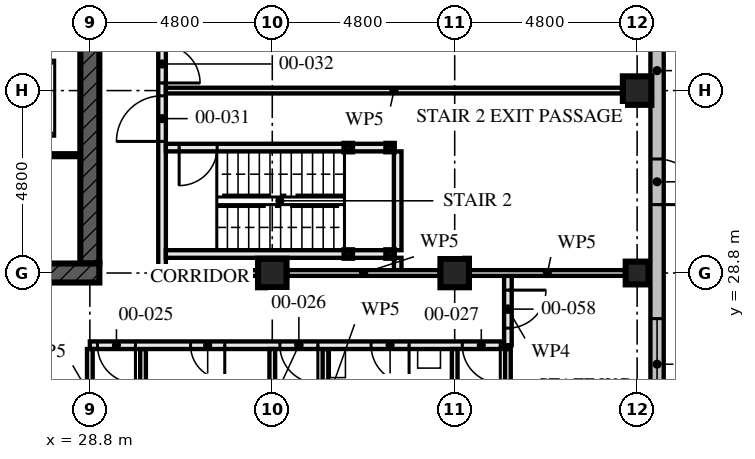
"""IFC4 building model, lengths in metres.
Left out: names, types, materials, properties, quantities, classifications, styles, units other than length and angle.
Written with IfcOpenShell. Run it as: python <this file> out.ifc"""

import sys

from ifc_helpers import new_model, si_unit, direction, frame, frame_2d, origin, origin_2d, place, context, subcontext, project, spatial, rectangle, hollow_rectangle, extrude, element, fill, save


model = new_model("IFC4")
c1 = context("Model", 3, precision=1e-05, world=origin(), true_north=direction((0.0, 1.0)))
c2 = subcontext(c1, "Body", "Model", "MODEL_VIEW")
j1 = project(units=[si_unit("LENGTHUNIT", "METRE"), si_unit("PLANEANGLEUNIT", "RADIAN")], contexts=[c1])
p1 = place(None, origin())
s1 = spatial("IfcSite", under=j1, at=p1, CompositionType="ELEMENT")
p2 = place(p1, origin())
s2 = spatial("IfcBuilding", under=s1, at=p2, CompositionType="ELEMENT")
p3 = place(p2, origin())
s3 = spatial("IfcBuildingStorey", under=s2, at=p3, CompositionType="ELEMENT", Elevation=0.0)
for number, where, z_axis, x_axis in (
    (1, (33.6, 28.8, 0.0), (0.0, 0.0, 1.0), (0.0, 1.0, 0.0)),
    (2, (38.4, 28.8, 0.0), (0.0, 0.0, 1.0), (0.0, 1.0, 0.0)),
):
    element("IfcColumn", number, at=place(p3, frame(where, z_axis=z_axis, x_axis=x_axis)), inside=s3, PredefinedType="COLUMN", context=c2, shape_type="SweptSolid", body=[
        extrude(hollow_rectangle(XDim=0.75, YDim=0.75, WallThickness=0.08, at=origin_2d()), origin(), (0.0, 0.0, 1.0), 4.5),
    ])
p4 = place(p3, frame((43.2, 28.8, 0.0), z_axis=(0.0, 0.0, 1.0), x_axis=(0.0, 1.0, 0.0)))
e3 = element("IfcColumn", 3, at=p4, inside=s3, PredefinedType="COLUMN", context=c2, shape_type="SweptSolid", body=[
    extrude(hollow_rectangle(XDim=0.6, YDim=0.6, WallThickness=0.08, at=origin_2d()), origin(), (0.0, 0.0, 1.0), 4.5),
])
p5 = place(p3, frame((43.2, 33.6, 0.0), z_axis=(0.0, 0.0, 1.0), x_axis=(1.0, 0.0, 0.0)))
e4 = element("IfcColumn", 4, at=p5, inside=s3, PredefinedType="COLUMN", context=c2, shape_type="SweptSolid", body=[
    extrude(hollow_rectangle(XDim=0.75, YDim=0.75, WallThickness=0.08, at=origin_2d()), origin(), (0.0, 0.0, 1.0), 4.5),
])
p6 = place(p3, frame((14.15, 28.8, -1.8), z_axis=(0.0, 0.0, 1.0), x_axis=(1.0, 0.0, 0.0)))
e5 = element("IfcWall", 5, at=p6, inside=s3, PredefinedType="SHEAR", context=c2, shape_type="SweptSolid", body=[
    extrude(rectangle(XDim=14.9, YDim=0.5, at=frame_2d((7.45, 0.0))), origin(), (0.0, 0.0, 1.0), 6.13),
])
p7 = place(p6, frame((6.85, 0.0, 1.8)))
e6 = element("IfcOpeningElement", 6, at=p7, cuts=e5, PredefinedType="OPENING", context=c2, shape_type="SweptSolid", body=[
    extrude(rectangle(XDim=1.2, YDim=2.1, at=frame_2d((0.6, 1.05))), frame((0.0, 0.26, 0.0), z_axis=(0.0, -1.0, 0.0), x_axis=(1.0, 0.0, 0.0)), (0.0, 0.0, 1.0), 0.521),
])
p8 = place(p3, frame((28.8, 29.05, -1.8), z_axis=(0.0, 0.0, 1.0), x_axis=(0.0, 1.0, 0.0)))
e7 = element("IfcWall", 7, at=p8, inside=s3, PredefinedType="SHEAR", context=c2, shape_type="SweptSolid", body=[
    extrude(rectangle(XDim=13.9, YDim=0.5, at=frame_2d((6.95, 0.0))), origin(), (0.0, 0.0, 1.0), 6.13),
])
p9 = place(p8, frame((6.35, 0.0, 1.8)))
e8 = element("IfcOpeningElement", 8, at=p9, cuts=e7, PredefinedType="OPENING", context=c2, shape_type="SweptSolid", body=[
    extrude(rectangle(XDim=1.2, YDim=2.1, at=frame_2d((0.6, 1.05))), frame((0.0, 0.26, 0.0), z_axis=(0.0, -1.0, 0.0), x_axis=(1.0, 0.0, 0.0)), (0.0, 0.0, 1.0), 0.521),
])
for number, where, z_axis, x_axis in (
    (9, (36.7, 29.3, 0.0), (0.0, 0.0, 1.0), (1.0, 0.0, 0.0)),
    (10, (36.7, 32.1, 0.0), (0.0, 0.0, 1.0), (1.0, 0.0, 0.0)),
    (11, (35.6, 29.3, 0.0), (0.0, 0.0, 1.0), (1.0, 0.0, 0.0)),
    (12, (35.6, 32.1, 0.0), (0.0, 0.0, 1.0), (1.0, 0.0, 0.0)),
):
    element("IfcColumn", number, at=place(p3, frame(where, z_axis=z_axis, x_axis=x_axis)), inside=s3, PredefinedType="COLUMN", context=c2, shape_type="SweptSolid", body=[
        extrude(hollow_rectangle(XDim=0.2, YDim=0.2, WallThickness=0.008, at=origin_2d()), origin(), (0.0, 0.0, 1.0), 4.33),
    ])
p10 = place(p3, frame((43.725, 14.925, 0.0), z_axis=(0.0, 0.0, 1.0), x_axis=(0.0, 1.0, 0.0)))
e13 = element("IfcWall", 13, at=p10, inside=s3, PredefinedType="SOLIDWALL", context=c2, shape_type="SweptSolid", body=[
    extrude(rectangle(XDim=38.4, YDim=0.35, at=frame_2d((19.2, 0.0))), origin(), (0.0, 0.0, 1.0), 4.5),
])
p11 = place(p10, frame((15.675, 0.0, 0.0)))
e14 = element("IfcOpeningElement", 14, at=p11, cuts=e13, PredefinedType="OPENING", context=c2, shape_type="SweptSolid", body=[
    extrude(rectangle(XDim=1.2, YDim=2.4, at=frame_2d((0.6, 1.2))), frame((0.0, 0.186, 0.0), z_axis=(0.0, -1.0, 0.0), x_axis=(1.0, 0.0, 0.0)), (0.0, 0.0, 1.0), 0.371),
])
p12 = place(p10, frame((0.675, 0.0, 0.9)))
e15 = element("IfcOpeningElement", 15, at=p12, cuts=e13, PredefinedType="OPENING", context=c2, shape_type="SweptSolid", body=[
    extrude(rectangle(XDim=2.4, YDim=2.4, at=frame_2d((1.2, 1.2))), frame((0.0, 0.186, 0.0), z_axis=(0.0, -1.0, 0.0), x_axis=(1.0, 0.0, 0.0)), (0.0, 0.0, 1.0), 0.371),
])
p13 = place(p10, frame((5.475, 0.0, 0.9)))
e16 = element("IfcOpeningElement", 16, at=p13, cuts=e13, PredefinedType="OPENING", context=c2, shape_type="SweptSolid", body=[
    extrude(rectangle(XDim=2.4, YDim=2.4, at=frame_2d((1.2, 1.2))), frame((0.0, 0.186, 0.0), z_axis=(0.0, -1.0, 0.0), x_axis=(1.0, 0.0, 0.0)), (0.0, 0.0, 1.0), 0.371),
])
p14 = place(p10, frame((10.275, 0.0, 0.9)))
e17 = element("IfcOpeningElement", 17, at=p14, cuts=e13, PredefinedType="OPENING", context=c2, shape_type="SweptSolid", body=[
    extrude(rectangle(XDim=2.4, YDim=2.4, at=frame_2d((1.2, 1.2))), frame((0.0, 0.186, 0.0), z_axis=(0.0, -1.0, 0.0), x_axis=(1.0, 0.0, 0.0)), (0.0, 0.0, 1.0), 0.371),
])
p15 = place(p10, frame((19.875, 0.0, 0.9)))
e18 = element("IfcOpeningElement", 18, at=p15, cuts=e13, PredefinedType="OPENING", context=c2, shape_type="SweptSolid", body=[
    extrude(rectangle(XDim=2.4, YDim=2.4, at=frame_2d((1.2, 1.2))), frame((0.0, 0.186, 0.0), z_axis=(0.0, -1.0, 0.0), x_axis=(1.0, 0.0, 0.0)), (0.0, 0.0, 1.0), 0.371),
])
p16 = place(p10, frame((24.675, 0.0, 0.9)))
e19 = element("IfcOpeningElement", 19, at=p16, cuts=e13, PredefinedType="OPENING", context=c2, shape_type="SweptSolid", body=[
    extrude(rectangle(XDim=2.4, YDim=2.4, at=frame_2d((1.2, 1.2))), frame((0.0, 0.186, 0.0), z_axis=(0.0, -1.0, 0.0), x_axis=(1.0, 0.0, 0.0)), (0.0, 0.0, 1.0), 0.371),
])
p17 = place(p10, frame((29.475, 0.0, 0.9)))
e20 = element("IfcOpeningElement", 20, at=p17, cuts=e13, PredefinedType="OPENING", context=c2, shape_type="SweptSolid", body=[
    extrude(rectangle(XDim=2.4, YDim=2.4, at=frame_2d((1.2, 1.2))), frame((0.0, 0.186, 0.0), z_axis=(0.0, -1.0, 0.0), x_axis=(1.0, 0.0, 0.0)), (0.0, 0.0, 1.0), 0.371),
])
p18 = place(p10, frame((34.275, 0.0, 0.9)))
e21 = element("IfcOpeningElement", 21, at=p18, cuts=e13, PredefinedType="OPENING", context=c2, shape_type="SweptSolid", body=[
    extrude(rectangle(XDim=2.4, YDim=2.4, at=frame_2d((1.2, 1.2))), frame((0.0, 0.186, 0.0), z_axis=(0.0, -1.0, 0.0), x_axis=(1.0, 0.0, 0.0)), (0.0, 0.0, 1.0), 0.371),
])
for number, where, z_axis, x_axis in (
    (22, (30.2, 23.8, 0.0), (0.0, 0.0, 1.0), (0.0, 1.0, 0.0)),
    (23, (35.0, 23.8, 0.0), (0.0, 0.0, 1.0), (0.0, 1.0, 0.0)),
    (24, (39.8, 23.8, 0.0), (0.0, 0.0, 1.0), (0.0, 1.0, 0.0)),
):
    element("IfcWall", number, at=place(p3, frame(where, z_axis=z_axis, x_axis=x_axis)), inside=s3, PredefinedType="PARTITIONING", context=c2, shape_type="SweptSolid", body=[
        extrude(rectangle(XDim=3.0, YDim=0.15, at=frame_2d((1.5, 0.0))), origin(), (0.0, 0.0, 1.0), 3.55),
    ])
p19 = place(p3, frame((33.6, 14.705, 0.0), z_axis=(0.0, 0.0, 1.0), x_axis=(0.0, 1.0, 0.0)))
e25 = element("IfcWall", 25, at=p19, inside=s3, PredefinedType="PARTITIONING", context=c2, shape_type="SweptSolid", body=[
    extrude(rectangle(XDim=12.095, YDim=0.15, at=frame_2d((6.048, 0.0))), origin(), (0.0, 0.0, 1.0), 3.55),
])
p20 = place(p3, frame((38.4, 19.504, 0.0), z_axis=(0.0, 0.0, 1.0), x_axis=(0.0, 1.0, 0.0)))
e26 = element("IfcWall", 26, at=p20, inside=s3, PredefinedType="PARTITIONING", context=c2, shape_type="SweptSolid", body=[
    extrude(rectangle(XDim=7.296, YDim=0.15, at=frame_2d((3.648, 0.0))), origin(), (0.0, 0.0, 1.0), 3.55),
])
p21 = place(p3, frame((28.8, 26.9, 0.0), z_axis=(0.0, 0.0, 1.0), x_axis=(1.0, 0.0, 0.0)))
e27 = element("IfcWall", 27, at=p21, inside=s3, PredefinedType="PARTITIONING", context=c2, shape_type="SweptSolid", body=[
    extrude(rectangle(XDim=11.0, YDim=0.2, at=frame_2d((5.5, 0.0))), origin(), (0.0, 0.0, 1.0), 4.33),
])
p22 = place(p21, frame((0.2, 0.0, 0.0)))
e28 = element("IfcOpeningElement", 28, at=p22, cuts=e27, PredefinedType="OPENING", context=c2, shape_type="SweptSolid", body=[
    extrude(rectangle(XDim=1.0, YDim=2.4, at=frame_2d((0.5, 1.2))), frame((0.0, 0.111, 0.0), z_axis=(0.0, -1.0, 0.0), x_axis=(1.0, 0.0, 0.0)), (0.0, 0.0, 1.0), 0.221),
])
p23 = place(p21, frame((5.0, 0.0, 0.0)))
e29 = element("IfcOpeningElement", 29, at=p23, cuts=e27, PredefinedType="OPENING", context=c2, shape_type="SweptSolid", body=[
    extrude(rectangle(XDim=1.0, YDim=2.4, at=frame_2d((0.5, 1.2))), frame((0.0, 0.111, 0.0), z_axis=(0.0, -1.0, 0.0), x_axis=(1.0, 0.0, 0.0)), (0.0, 0.0, 1.0), 0.221),
])
p24 = place(p21, frame((9.8, 0.0, 0.0)))
e30 = element("IfcOpeningElement", 30, at=p24, cuts=e27, PredefinedType="OPENING", context=c2, shape_type="SweptSolid", body=[
    extrude(rectangle(XDim=1.0, YDim=2.4, at=frame_2d((0.5, 1.2))), frame((0.0, 0.111, 0.0), z_axis=(0.0, -1.0, 0.0), x_axis=(1.0, 0.0, 0.0)), (0.0, 0.0, 1.0), 0.221),
])
p25 = place(p21, frame((2.65, 0.0, 0.0)))
e31 = element("IfcOpeningElement", 31, at=p25, cuts=e27, PredefinedType="OPENING", context=c2, shape_type="SweptSolid", body=[
    extrude(rectangle(XDim=0.9, YDim=2.1, at=frame_2d((0.45, 1.05))), frame((0.0, 0.111, 0.0), z_axis=(0.0, -1.0, 0.0), x_axis=(1.0, 0.0, 0.0)), (0.0, 0.0, 1.0), 0.221),
])
p26 = place(p21, frame((7.4, 0.0, 0.0)))
e32 = element("IfcOpeningElement", 32, at=p26, cuts=e27, PredefinedType="OPENING", context=c2, shape_type="SweptSolid", body=[
    extrude(rectangle(XDim=1.0, YDim=2.1, at=frame_2d((0.5, 1.05))), frame((0.0, 0.111, 0.0), z_axis=(0.0, -1.0, 0.0), x_axis=(1.0, 0.0, 0.0)), (0.0, 0.0, 1.0), 0.221),
])
p27 = place(p3, frame((36.6, 29.3, 0.0), z_axis=(0.0, 0.0, 1.0), x_axis=(-1.0, 0.0, 0.0)))
e33 = element("IfcWall", 33, at=p27, inside=s3, PredefinedType="SOLIDWALL", context=c2, shape_type="SweptSolid", body=[
    extrude(rectangle(XDim=0.9, YDim=0.2, at=frame_2d((0.45, 0.0))), origin(), (0.0, 0.0, 1.0), 3.99),
])
p28 = place(p3, frame((35.5, 29.3, 0.0), z_axis=(0.0, 0.0, 1.0), x_axis=(-1.0, 0.0, 0.0)))
e34 = element("IfcWall", 34, at=p28, inside=s3, PredefinedType="SOLIDWALL", context=c2, shape_type="SweptSolid", body=[
    extrude(rectangle(XDim=4.7, YDim=0.2, at=frame_2d((2.35, 0.0))), origin(), (0.0, 0.0, 1.0), 3.99),
])
p29 = place(p3, frame((36.6, 32.1, 0.0), z_axis=(0.0, 0.0, 1.0), x_axis=(-1.0, 0.0, 0.0)))
e35 = element("IfcWall", 35, at=p29, inside=s3, PredefinedType="SOLIDWALL", context=c2, shape_type="SweptSolid", body=[
    extrude(rectangle(XDim=0.9, YDim=0.2, at=frame_2d((0.45, 0.0))), origin(), (0.0, 0.0, 1.0), 3.99),
])
p30 = place(p3, frame((35.5, 32.1, 0.0), z_axis=(0.0, 0.0, 1.0), x_axis=(-1.0, 0.0, 0.0)))
e36 = element("IfcWall", 36, at=p30, inside=s3, PredefinedType="SOLIDWALL", context=c2, shape_type="SweptSolid", body=[
    extrude(rectangle(XDim=4.7, YDim=0.2, at=frame_2d((2.35, 0.0))), origin(), (0.0, 0.0, 1.0), 3.99),
])
p31 = place(p30, frame((3.35, 0.0, 0.0)))
e37 = element("IfcOpeningElement", 37, at=p31, cuts=e36, PredefinedType="OPENING", context=c2, shape_type="SweptSolid", body=[
    extrude(rectangle(XDim=1.0, YDim=2.1, at=frame_2d((0.5, 1.05))), frame((0.0, 0.111, 0.0), z_axis=(0.0, -1.0, 0.0), x_axis=(1.0, 0.0, 0.0)), (0.0, 0.0, 1.0), 0.221),
])
p32 = place(p3, frame((36.9, 28.875, 0.0), z_axis=(0.0, 0.0, 1.0), x_axis=(0.0, 1.0, 0.0)))
e38 = element("IfcWall", 38, at=p32, inside=s3, PredefinedType="SOLIDWALL", context=c2, shape_type="SweptSolid", body=[
    extrude(rectangle(XDim=0.325, YDim=0.2, at=frame_2d((0.163, 0.0))), origin(), (0.0, 0.0, 1.0), 4.33),
])
p33 = place(p3, frame((36.9, 29.4, 0.0), z_axis=(0.0, 0.0, 1.0), x_axis=(0.0, 1.0, 0.0)))
e39 = element("IfcWall", 39, at=p33, inside=s3, PredefinedType="SOLIDWALL", context=c2, shape_type="SweptSolid", body=[
    extrude(rectangle(XDim=2.6, YDim=0.2, at=frame_2d((1.3, 0.0))), origin(), (0.0, 0.0, 1.0), 4.33),
])
p34 = place(p3, frame((42.805, 33.6, 0.0), z_axis=(0.0, 0.0, 1.0), x_axis=(-1.0, 0.0, 0.0)))
e40 = element("IfcWall", 40, at=p34, inside=s3, PredefinedType="PARTITIONING", context=c2, shape_type="SweptSolid", body=[
    extrude(rectangle(XDim=12.005, YDim=0.15, at=frame_2d((6.002, 0.0))), origin(), (0.0, 0.0, 1.0), 3.55),
])
p35 = place(p3, frame((30.7, 28.8, 0.0), z_axis=(0.0, 0.0, 1.0), x_axis=(0.0, 1.0, 0.0)))
e41 = element("IfcWall", 41, at=p35, inside=s3, PredefinedType="PARTITIONING", context=c2, shape_type="SweptSolid", body=[
    extrude(rectangle(XDim=14.4, YDim=0.2, at=frame_2d((7.2, 0.0))), origin(), (0.0, 0.0, 1.0), 3.55),
])
p36 = place(p35, frame((3.462, 0.0, 0.0)))
e42 = element("IfcOpeningElement", 42, at=p36, cuts=e41, PredefinedType="OPENING", context=c2, shape_type="SweptSolid", body=[
    extrude(rectangle(XDim=1.2, YDim=2.4, at=frame_2d((0.6, 1.2))), frame((0.0, 0.111, 0.0), z_axis=(0.0, -1.0, 0.0), x_axis=(1.0, 0.0, 0.0)), (0.0, 0.0, 1.0), 0.221),
])
p37 = place(p35, frame((5.0, 0.0, 0.0)))
e43 = element("IfcOpeningElement", 43, at=p37, cuts=e41, PredefinedType="OPENING", context=c2, shape_type="SweptSolid", body=[
    extrude(rectangle(XDim=1.0, YDim=2.4, at=frame_2d((0.5, 1.2))), frame((0.0, 0.111, 0.0), z_axis=(0.0, -1.0, 0.0), x_axis=(1.0, 0.0, 0.0)), (0.0, 0.0, 1.0), 0.221),
])
p38 = place(p35, frame((9.8, 0.0, 0.0)))
e44 = element("IfcOpeningElement", 44, at=p38, cuts=e41, PredefinedType="OPENING", context=c2, shape_type="SweptSolid", body=[
    extrude(rectangle(XDim=1.0, YDim=2.4, at=frame_2d((0.5, 1.2))), frame((0.0, 0.111, 0.0), z_axis=(0.0, -1.0, 0.0), x_axis=(1.0, 0.0, 0.0)), (0.0, 0.0, 1.0), 0.221),
])
p39 = place(p35, frame((7.45, 0.0, 0.0)))
e45 = element("IfcOpeningElement", 45, at=p39, cuts=e41, PredefinedType="OPENING", context=c2, shape_type="SweptSolid", body=[
    extrude(rectangle(XDim=0.9, YDim=2.1, at=frame_2d((0.45, 1.05))), frame((0.0, 0.111, 0.0), z_axis=(0.0, -1.0, 0.0), x_axis=(1.0, 0.0, 0.0)), (0.0, 0.0, 1.0), 0.221),
])
p40 = place(p35, frame((12.2, 0.0, 0.0)))
e46 = element("IfcOpeningElement", 46, at=p40, cuts=e41, PredefinedType="OPENING", context=c2, shape_type="SweptSolid", body=[
    extrude(rectangle(XDim=1.0, YDim=2.1, at=frame_2d((0.5, 1.05))), frame((0.0, 0.111, 0.0), z_axis=(0.0, -1.0, 0.0), x_axis=(1.0, 0.0, 0.0)), (0.0, 0.0, 1.0), 0.221),
])
p41 = place(p3, frame((23.15, 31.9, -1.8), z_axis=(0.0, 0.0, 1.0), x_axis=(1.0, 0.0, 0.0)))
e47 = element("IfcWall", 47, at=p41, inside=s3, PredefinedType="SOLIDWALL", context=c2, shape_type="SweptSolid", body=[
    extrude(rectangle(XDim=5.4, YDim=0.1, at=frame_2d((2.7, 0.0))), origin(), (0.0, 0.0, 1.0), 6.13),
])
p42 = place(p3, frame((28.8, 24.395, 0.0), z_axis=(0.0, 0.0, 1.0), x_axis=(0.0, 1.0, 0.0)))
e48 = element("IfcWall", 48, at=p42, inside=s3, PredefinedType="PARTITIONING", context=c2, shape_type="SweptSolid", body=[
    extrude(rectangle(XDim=2.405, YDim=0.15, at=frame_2d((1.203, 0.0))), origin(), (0.0, 0.0, 1.0), 3.32),
])
p43 = place(p3, frame((42.88, 28.8, 0.0), z_axis=(0.0, 0.0, 1.0), x_axis=(-1.0, 0.0, 0.0)))
e49 = element("IfcWall", 49, at=p43, inside=s3, PredefinedType="PARTITIONING", context=c2, shape_type="SweptSolid", body=[
    extrude(rectangle(XDim=4.085, YDim=0.15, at=frame_2d((2.042, 0.0))), origin(), (0.0, 0.0, 1.0), 3.32),
])
p44 = place(p3, frame((38.005, 28.8, 0.0), z_axis=(0.0, 0.0, 1.0), x_axis=(-1.0, 0.0, 0.0)))
e50 = element("IfcWall", 50, at=p44, inside=s3, PredefinedType="PARTITIONING", context=c2, shape_type="SweptSolid", body=[
    extrude(rectangle(XDim=4.01, YDim=0.15, at=frame_2d((2.005, 0.0))), origin(), (0.0, 0.0, 1.0), 3.32),
])
p45 = place(p3, frame((33.205, 28.8, 0.0), z_axis=(0.0, 0.0, 1.0), x_axis=(-1.0, 0.0, 0.0)))
e51 = element("IfcWall", 51, at=p45, inside=s3, PredefinedType="PARTITIONING", context=c2, shape_type="SweptSolid", body=[
    extrude(rectangle(XDim=2.505, YDim=0.15, at=frame_2d((1.252, 0.0))), origin(), (0.0, 0.0, 1.0), 3.32),
])
p46 = place(p3, frame((39.8, 26.9, 0.0), z_axis=(0.0, 0.0, 1.0), x_axis=(0.0, 1.0, 0.0)))
e52 = element("IfcWall", 52, at=p46, inside=s3, PredefinedType="PARTITIONING", context=c2, shape_type="SweptSolid", body=[
    extrude(rectangle(XDim=1.9, YDim=0.2, at=frame_2d((0.95, 0.0))), origin(), (0.0, 0.0, 1.0), 4.33),
])
p47 = place(p46, frame((0.45, 0.0, 0.0)))
e53 = element("IfcOpeningElement", 53, at=p47, cuts=e52, PredefinedType="OPENING", context=c2, shape_type="SweptSolid", body=[
    extrude(rectangle(XDim=1.0, YDim=2.1, at=frame_2d((0.5, 1.05))), frame((0.0, 0.111, 0.0), z_axis=(0.0, -1.0, 0.0), x_axis=(1.0, 0.0, 0.0)), (0.0, 0.0, 1.0), 0.221),
])
p48 = place(p11, frame((1.2, 0.0, 0.0), z_axis=(0.0, 0.0, 1.0), x_axis=(-1.0, 0.0, 0.0)))
e54 = element("IfcDoor", 54, at=p48, inside=s3, OperationType="SINGLE_SWING_LEFT", PredefinedType="DOOR", context=c2, shape_type="SweptSolid", body=[
    extrude(rectangle(XDim=1.2, YDim=2.4, at=frame_2d((0.6, 1.2))), frame((0.0, 0.027, 0.0), z_axis=(0.0, -1.0, 0.0), x_axis=(1.0, 0.0, 0.0)), (0.0, 0.0, 1.0), 0.054),
])
fill(e14, e54)
p49 = place(p14, origin())
e55 = element("IfcWindow", 55, at=p49, inside=s3, PartitioningType="SINGLE_PANEL", PredefinedType="WINDOW", context=c2, shape_type="SweptSolid", body=[
    extrude(rectangle(XDim=2.4, YDim=2.4, at=frame_2d((1.2, 1.2))), frame((0.0, 0.03, 0.0), z_axis=(0.0, -1.0, 0.0), x_axis=(1.0, 0.0, 0.0)), (0.0, 0.0, 1.0), 0.06),
])
fill(e17, e55)
p50 = place(p22, frame((1.0, 0.0, 0.0), z_axis=(0.0, 0.0, 1.0), x_axis=(-1.0, 0.0, 0.0)))
e56 = element("IfcDoor", 56, at=p50, inside=s3, OperationType="SINGLE_SWING_RIGHT", PredefinedType="DOOR", context=c2, shape_type="SweptSolid", body=[
    extrude(rectangle(XDim=1.0, YDim=2.4, at=frame_2d((0.5, 1.2))), frame((0.0, 0.027, 0.0), z_axis=(0.0, -1.0, 0.0), x_axis=(1.0, 0.0, 0.0)), (0.0, 0.0, 1.0), 0.054),
])
fill(e28, e56)
p51 = place(p23, frame((1.0, 0.0, 0.0), z_axis=(0.0, 0.0, 1.0), x_axis=(-1.0, 0.0, 0.0)))
e57 = element("IfcDoor", 57, at=p51, inside=s3, OperationType="SINGLE_SWING_RIGHT", PredefinedType="DOOR", context=c2, shape_type="SweptSolid", body=[
    extrude(rectangle(XDim=1.0, YDim=2.4, at=frame_2d((0.5, 1.2))), frame((0.0, 0.027, 0.0), z_axis=(0.0, -1.0, 0.0), x_axis=(1.0, 0.0, 0.0)), (0.0, 0.0, 1.0), 0.054),
])
fill(e29, e57)
p52 = place(p24, frame((1.0, 0.0, 0.0), z_axis=(0.0, 0.0, 1.0), x_axis=(-1.0, 0.0, 0.0)))
e58 = element("IfcDoor", 58, at=p52, inside=s3, OperationType="SINGLE_SWING_RIGHT", PredefinedType="DOOR", context=c2, shape_type="SweptSolid", body=[
    extrude(rectangle(XDim=1.0, YDim=2.4, at=frame_2d((0.5, 1.2))), frame((0.0, 0.027, 0.0), z_axis=(0.0, -1.0, 0.0), x_axis=(1.0, 0.0, 0.0)), (0.0, 0.0, 1.0), 0.054),
])
fill(e30, e58)
p53 = place(p25, frame((0.9, 0.0, 0.0), z_axis=(0.0, 0.0, 1.0), x_axis=(-1.0, 0.0, 0.0)))
e59 = element("IfcDoor", 59, at=p53, inside=s3, OperationType="SINGLE_SWING_RIGHT", PredefinedType="DOOR", context=c2, shape_type="SweptSolid", body=[
    extrude(rectangle(XDim=0.9, YDim=2.1, at=frame_2d((0.45, 1.05))), frame((0.0, 0.027, 0.0), z_axis=(0.0, -1.0, 0.0), x_axis=(1.0, 0.0, 0.0)), (0.0, 0.0, 1.0), 0.054),
])
fill(e31, e59)
p54 = place(p26, frame((1.0, 0.0, 0.0), z_axis=(0.0, 0.0, 1.0), x_axis=(-1.0, 0.0, 0.0)))
e60 = element("IfcDoor", 60, at=p54, inside=s3, OperationType="SINGLE_SWING_RIGHT", PredefinedType="DOOR", context=c2, shape_type="SweptSolid", body=[
    extrude(rectangle(XDim=1.0, YDim=2.1, at=frame_2d((0.5, 1.05))), frame((0.0, 0.027, 0.0), z_axis=(0.0, -1.0, 0.0), x_axis=(1.0, 0.0, 0.0)), (0.0, 0.0, 1.0), 0.054),
])
fill(e32, e60)
p55 = place(p31, origin())
e61 = element("IfcDoor", 61, at=p55, inside=s3, OperationType="SINGLE_SWING_LEFT", PredefinedType="DOOR", context=c2, shape_type="SweptSolid", body=[
    extrude(rectangle(XDim=1.0, YDim=2.1, at=frame_2d((0.5, 1.05))), frame((0.0, 0.032, 0.0), z_axis=(0.0, -1.0, 0.0), x_axis=(1.0, 0.0, 0.0)), (0.0, 0.0, 1.0), 0.064),
])
fill(e37, e61)
p56 = place(p36, origin())
e62 = element("IfcDoor", 62, at=p56, inside=s3, OperationType="SINGLE_SWING_RIGHT", PredefinedType="DOOR", context=c2, shape_type="SweptSolid", body=[
    extrude(rectangle(XDim=1.2, YDim=2.4, at=frame_2d((0.6, 1.2))), frame((0.0, 0.027, 0.0), z_axis=(0.0, -1.0, 0.0), x_axis=(1.0, 0.0, 0.0)), (0.0, 0.0, 1.0), 0.054),
])
fill(e42, e62)
p57 = place(p37, frame((1.0, 0.0, 0.0), z_axis=(0.0, 0.0, 1.0), x_axis=(-1.0, 0.0, 0.0)))
e63 = element("IfcDoor", 63, at=p57, inside=s3, OperationType="SINGLE_SWING_LEFT", PredefinedType="DOOR", context=c2, shape_type="SweptSolid", body=[
    extrude(rectangle(XDim=1.0, YDim=2.4, at=frame_2d((0.5, 1.2))), frame((0.0, 0.027, 0.0), z_axis=(0.0, -1.0, 0.0), x_axis=(1.0, 0.0, 0.0)), (0.0, 0.0, 1.0), 0.054),
])
fill(e43, e63)
p58 = place(p47, frame((1.0, 0.0, 0.0), z_axis=(0.0, 0.0, 1.0), x_axis=(-1.0, 0.0, 0.0)))
e64 = element("IfcDoor", 64, at=p58, inside=s3, OperationType="SINGLE_SWING_RIGHT", PredefinedType="DOOR", context=c2, shape_type="SweptSolid", body=[
    extrude(rectangle(XDim=1.0, YDim=2.1, at=frame_2d((0.5, 1.05))), frame((0.0, 0.027, 0.0), z_axis=(0.0, -1.0, 0.0), x_axis=(1.0, 0.0, 0.0)), (0.0, 0.0, 1.0), 0.054),
])
fill(e53, e64)
save(model, sys.argv[1])
